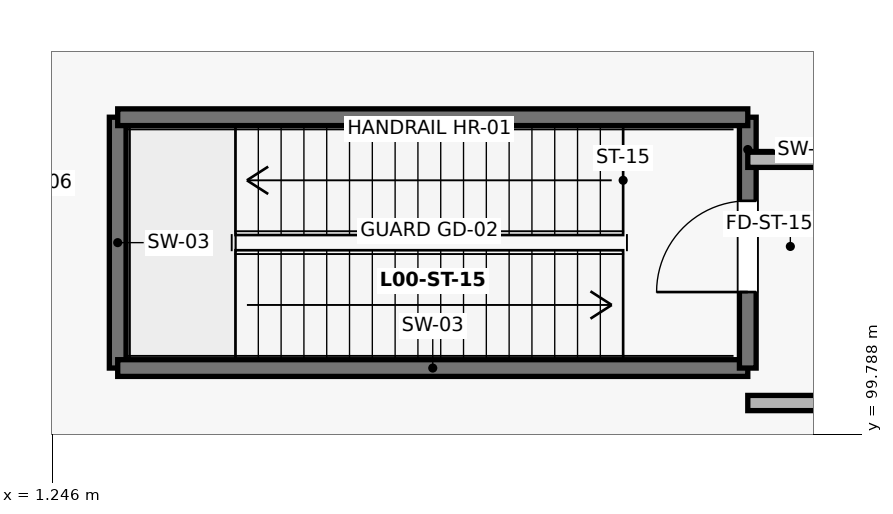
"""IFC4 building model, lengths in metres.
Left out: names, types, materials, properties, quantities, classifications, styles, units other than length and angle.
Written with IfcOpenShell. Run it as: python <this file> out.ifc"""

import sys

from ifc_helpers import new_model, si_unit, direction, frame, frame_2d, origin, place, context, subcontext, project, spatial, rectangle, extrude, element, fill, save


model = new_model("IFC4")
c1 = context("Model", 3, precision=1e-05, world=origin(), true_north=direction((0.0, 1.0)))
c2 = subcontext(c1, "Body", "Model", "MODEL_VIEW")
j1 = project(units=[si_unit("LENGTHUNIT", "METRE"), si_unit("PLANEANGLEUNIT", "RADIAN")], contexts=[c1])
p1 = place(None, origin())
s1 = spatial("IfcSite", under=j1, at=p1, CompositionType="ELEMENT")
p2 = place(p1, origin())
s2 = spatial("IfcBuilding", under=s1, at=p2, CompositionType="ELEMENT")
p3 = place(p2, origin())
s3 = spatial("IfcBuildingStorey", under=s2, at=p3, CompositionType="ELEMENT", Elevation=0.0)
p4 = place(p3, frame((2.11, 103.96, 0.0), z_axis=(0.0, 0.0, 1.0), x_axis=(0.0, -1.0, 0.0)))
e1 = element("IfcWall", 1, at=p4, inside=s3, PredefinedType="SHEAR", context=c2, shape_type="SweptSolid", body=[
    extrude(rectangle(XDim=3.3, YDim=0.22, at=frame_2d((1.65, 0.0))), origin(), (0.0, 0.0, 1.0), 6.26),
])
p5 = place(p3, frame((2.11, 100.66, 0.0), z_axis=(0.0, 0.0, 1.0), x_axis=(1.0, 0.0, 0.0)))
e2 = element("IfcWall", 2, at=p5, inside=s3, PredefinedType="SHEAR", context=c2, shape_type="SweptSolid", body=[
    extrude(rectangle(XDim=8.29, YDim=0.22, at=frame_2d((4.145, 0.0))), origin(), (0.0, 0.0, 1.0), 6.26),
])
p6 = place(p3, frame((10.4, 100.66, 0.0), z_axis=(0.0, 0.0, 1.0), x_axis=(0.0, 1.0, 0.0)))
e3 = element("IfcWall", 3, at=p6, inside=s3, PredefinedType="SHEAR", context=c2, shape_type="SweptSolid", body=[
    extrude(rectangle(XDim=3.3, YDim=0.22, at=frame_2d((1.65, 0.0))), origin(), (0.0, 0.0, 1.0), 6.26),
])
p7 = place(p6, frame((1.0, 0.0, 0.0)))
e4 = element("IfcOpeningElement", 4, at=p7, cuts=e3, PredefinedType="OPENING", context=c2, shape_type="SweptSolid", body=[
    extrude(rectangle(XDim=1.2, YDim=2.2, at=frame_2d((0.6, 1.1))), frame((0.0, 0.125, 0.0), z_axis=(0.0, -1.0, 0.0), x_axis=(1.0, 0.0, 0.0)), (0.0, 0.0, 1.0), 0.25),
])
p8 = place(p3, frame((10.4, 103.96, 0.0), z_axis=(0.0, 0.0, 1.0), x_axis=(-1.0, 0.0, 0.0)))
e5 = element("IfcWall", 5, at=p8, inside=s3, PredefinedType="SHEAR", context=c2, shape_type="SweptSolid", body=[
    extrude(rectangle(XDim=8.29, YDim=0.22, at=frame_2d((4.145, 0.0))), origin(), (0.0, 0.0, 1.0), 6.26),
])
for number, where, z_axis, x_axis in (
    (6, (10.4, 100.2, 0.0), (0.0, 0.0, 1.0), (1.0, 0.0, 0.0)),
    (7, (10.4, 103.4, 0.0), (0.0, 0.0, 1.0), (1.0, 0.0, 0.0)),
):
    element("IfcWall", number, at=place(p3, frame(where, z_axis=z_axis, x_axis=x_axis)), inside=s3, PredefinedType="PARTITIONING", context=c2, shape_type="SweptSolid", body=[
        extrude(rectangle(XDim=7.8, YDim=0.2, at=frame_2d((3.9, 0.0))), origin(), (0.0, 0.0, 1.0), 4.893),
    ])
p9 = place(p7, origin())
e8 = element("IfcDoor", 8, at=p9, inside=s3, OperationType="SINGLE_SWING_LEFT", PredefinedType="DOOR", context=c2, shape_type="SweptSolid", body=[
    extrude(rectangle(XDim=1.2, YDim=2.2, at=frame_2d((0.6, 1.1))), frame((0.0, 0.025, 0.0), z_axis=(0.0, -1.0, 0.0), x_axis=(1.0, 0.0, 0.0)), (0.0, 0.0, 1.0), 0.05),
])
fill(e4, e8)
save(model, sys.argv[1])
